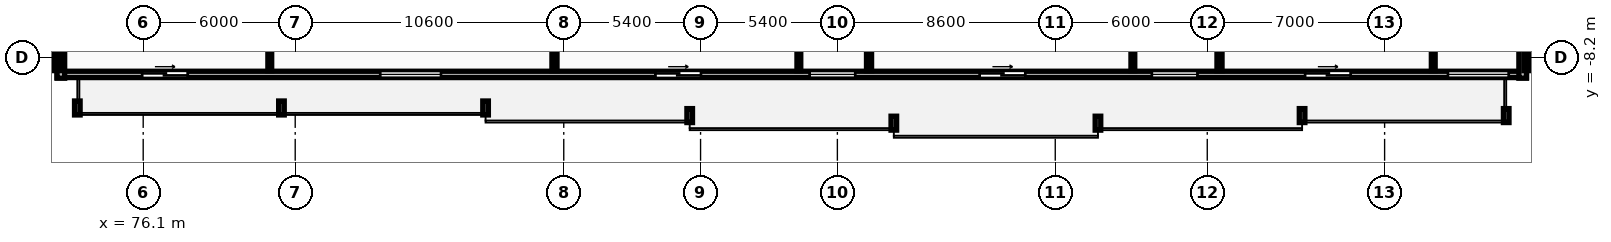
"""IFC4 building model, lengths in metres.
Left out: names, types, materials, properties, quantities, classifications, styles, units other than length and angle.
Written with IfcOpenShell. Run it as: python <this file> out.ifc"""

import sys

from ifc_helpers import new_model, si_unit, direction, frame, frame_2d, origin, place, context, subcontext, project, spatial, rectangle, extrude, element, fill, save


model = new_model("IFC4")
c1 = context("Model", 3, precision=1e-05, world=origin(), true_north=direction((0.0, 1.0)))
c2 = subcontext(c1, "Body", "Model", "MODEL_VIEW")
j1 = project(units=[si_unit("LENGTHUNIT", "METRE"), si_unit("PLANEANGLEUNIT", "RADIAN")], contexts=[c1])
p1 = place(None, origin())
s1 = spatial("IfcSite", under=j1, at=p1, CompositionType="ELEMENT")
p2 = place(p1, origin())
s2 = spatial("IfcBuilding", under=s1, at=p2, CompositionType="ELEMENT")
p3 = place(p2, frame((0.0, 0.0, 113.3)))
s3 = spatial("IfcBuildingStorey", under=s2, at=p3, CompositionType="ELEMENT", Elevation=113.3)
p4 = place(p3, frame((72.7, -8.85, 0.0), z_axis=(0.0, 0.0, 1.0), x_axis=(1.0, 0.0, 0.0)))
e1 = element("IfcWall", 1, at=p4, inside=s3, PredefinedType="STANDARD", context=c2, shape_type="SweptSolid", body=[
    extrude(rectangle(XDim=58.0, YDim=0.25, at=frame_2d((29.0, 0.0))), origin(), (0.0, 0.0, 1.0), 2.97),
])
p5 = place(p4, frame((3.358, 0.0, 0.0)))
e2 = element("IfcOpeningElement", 2, at=p5, cuts=e1, PredefinedType="OPENING", context=c2, shape_type="SweptSolid", body=[
    extrude(rectangle(XDim=1.8, YDim=2.2, at=frame_2d((0.9, 1.1))), frame((0.0, 0.135, 0.0), z_axis=(0.0, -1.0, 0.0), x_axis=(1.0, 0.0, 0.0)), (0.0, 0.0, 1.0), 0.27),
])
p6 = place(p4, frame((12.755, 0.0, 0.85)))
e3 = element("IfcOpeningElement", 3, at=p6, cuts=e1, PredefinedType="OPENING", context=c2, shape_type="SweptSolid", body=[
    extrude(rectangle(XDim=2.4, YDim=1.9, at=frame_2d((1.2, 0.95))), frame((0.0, 0.135, 0.0), z_axis=(0.0, -1.0, 0.0), x_axis=(1.0, 0.0, 0.0)), (0.0, 0.0, 1.0), 0.27),
])
p7 = place(p4, frame((23.617, 0.0, 0.0)))
e4 = element("IfcOpeningElement", 4, at=p7, cuts=e1, PredefinedType="OPENING", context=c2, shape_type="SweptSolid", body=[
    extrude(rectangle(XDim=1.8, YDim=2.2, at=frame_2d((0.9, 1.1))), frame((0.0, 0.135, 0.0), z_axis=(0.0, -1.0, 0.0), x_axis=(1.0, 0.0, 0.0)), (0.0, 0.0, 1.0), 0.27),
])
p8 = place(p4, frame((29.705, 0.0, 0.85)))
e5 = element("IfcOpeningElement", 5, at=p8, cuts=e1, PredefinedType="OPENING", context=c2, shape_type="SweptSolid", body=[
    extrude(rectangle(XDim=1.8, YDim=1.8, at=frame_2d((0.9, 0.9))), frame((0.0, 0.135, 0.0), z_axis=(0.0, -1.0, 0.0), x_axis=(1.0, 0.0, 0.0)), (0.0, 0.0, 1.0), 0.27),
])
p9 = place(p4, frame((36.417, 0.0, 0.0)))
e6 = element("IfcOpeningElement", 6, at=p9, cuts=e1, PredefinedType="OPENING", context=c2, shape_type="SweptSolid", body=[
    extrude(rectangle(XDim=1.8, YDim=2.2, at=frame_2d((0.9, 1.1))), frame((0.0, 0.135, 0.0), z_axis=(0.0, -1.0, 0.0), x_axis=(1.0, 0.0, 0.0)), (0.0, 0.0, 1.0), 0.27),
])
p10 = place(p4, frame((43.213, 0.0, 0.85)))
e7 = element("IfcOpeningElement", 7, at=p10, cuts=e1, PredefinedType="OPENING", context=c2, shape_type="SweptSolid", body=[
    extrude(rectangle(XDim=1.8, YDim=1.8, at=frame_2d((0.9, 0.9))), frame((0.0, 0.135, 0.0), z_axis=(0.0, -1.0, 0.0), x_axis=(1.0, 0.0, 0.0)), (0.0, 0.0, 1.0), 0.27),
])
p11 = place(p4, frame((49.262, 0.0, 0.0)))
e8 = element("IfcOpeningElement", 8, at=p11, cuts=e1, PredefinedType="OPENING", context=c2, shape_type="SweptSolid", body=[
    extrude(rectangle(XDim=1.8, YDim=2.2, at=frame_2d((0.9, 1.1))), frame((0.0, 0.135, 0.0), z_axis=(0.0, -1.0, 0.0), x_axis=(1.0, 0.0, 0.0)), (0.0, 0.0, 1.0), 0.27),
])
p12 = place(p4, frame((54.9, 0.0, 0.85)))
e9 = element("IfcOpeningElement", 9, at=p12, cuts=e1, PredefinedType="OPENING", context=c2, shape_type="SweptSolid", body=[
    extrude(rectangle(XDim=2.4, YDim=1.9, at=frame_2d((1.2, 0.95))), frame((0.0, 0.135, 0.0), z_axis=(0.0, -1.0, 0.0), x_axis=(1.0, 0.0, 0.0)), (0.0, 0.0, 1.0), 0.27),
])
for number, where, z_axis, x_axis in (
    (10, (130.55, -9.0, 0.0), (0.0, 0.0, 1.0), (0.0, 1.0, 0.0)),
    (11, (72.85, -5.4, 0.0), (0.0, 0.0, 1.0), (0.0, -1.0, 0.0)),
):
    element("IfcWall", number, at=place(p3, frame(where, z_axis=z_axis, x_axis=x_axis)), inside=s3, PredefinedType="STANDARD", context=c2, shape_type="SweptSolid", body=[
        extrude(rectangle(XDim=3.6, YDim=0.3, at=frame_2d((1.8, 0.0))), origin(), (0.0, 0.0, 1.0), 2.97),
    ])
for number, where, z_axis, x_axis in (
    (12, (72.7, -8.7, 0.0), (0.0, 0.0, 1.0), (0.0, 1.0, 0.0)),
    (13, (130.7, -8.7, 0.0), (0.0, 0.0, 1.0), (0.0, 1.0, 0.0)),
    (14, (92.333, -8.7, 0.0), (0.0, 0.0, 1.0), (0.0, 1.0, 0.0)),
):
    element("IfcWall", number, at=place(p3, frame(where, z_axis=z_axis, x_axis=x_axis)), inside=s3, PredefinedType="PARTITIONING", context=c2, shape_type="SweptSolid", body=[
        extrude(rectangle(XDim=24.57, YDim=0.2, at=frame_2d((12.285, 0.0))), origin(), (0.0, 0.0, 1.0), 2.97),
    ])
p13 = place(p3, frame((81.097, -8.7, 0.0), z_axis=(0.0, 0.0, 1.0), x_axis=(0.0, 1.0, 0.0)))
e15 = element("IfcWall", 15, at=p13, inside=s3, PredefinedType="PARTITIONING", context=c2, shape_type="SweptSolid", body=[
    extrude(rectangle(XDim=5.17, YDim=0.15, at=frame_2d((2.585, 0.0))), origin(), (0.0, 0.0, 1.0), 2.97),
])
p14 = place(p3, frame((104.75, -8.7, 0.0), z_axis=(0.0, 0.0, 1.0), x_axis=(0.0, 1.0, 0.0)))
e16 = element("IfcWall", 16, at=p14, inside=s3, PredefinedType="PARTITIONING", context=c2, shape_type="SweptSolid", body=[
    extrude(rectangle(XDim=24.57, YDim=0.2, at=frame_2d((12.285, 0.0))), origin(), (0.0, 0.0, 1.0), 2.97),
])
p15 = place(p3, frame((101.98, -8.7, 0.0), z_axis=(0.0, 0.0, 1.0), x_axis=(0.0, 1.0, 0.0)))
e17 = element("IfcWall", 17, at=p15, inside=s3, PredefinedType="PARTITIONING", context=c2, shape_type="SweptSolid", body=[
    extrude(rectangle(XDim=10.31, YDim=0.15, at=frame_2d((5.155, 0.0))), origin(), (0.0, 0.0, 1.0), 2.97),
])
p16 = place(p15, frame((6.12, 0.0, 0.0)))
e18 = element("IfcOpeningElement", 18, at=p16, cuts=e17, PredefinedType="OPENING", context=c2, shape_type="SweptSolid", body=[
    extrude(rectangle(XDim=0.84, YDim=2.04, at=frame_2d((0.42, 1.02))), frame((0.0, 0.085, 0.0), z_axis=(0.0, -1.0, 0.0), x_axis=(1.0, 0.0, 0.0)), (0.0, 0.0, 1.0), 0.17),
])
p17 = place(p15, frame((8.04, 0.0, 0.0)))
e19 = element("IfcOpeningElement", 19, at=p17, cuts=e17, PredefinedType="OPENING", context=c2, shape_type="SweptSolid", body=[
    extrude(rectangle(XDim=0.84, YDim=2.04, at=frame_2d((0.42, 1.02))), frame((0.0, 0.085, 0.0), z_axis=(0.0, -1.0, 0.0), x_axis=(1.0, 0.0, 0.0)), (0.0, 0.0, 1.0), 0.17),
])
p18 = place(p15, frame((2.001, 0.0, 0.0)))
e20 = element("IfcOpeningElement", 20, at=p18, cuts=e17, PredefinedType="OPENING", context=c2, shape_type="SweptSolid", body=[
    extrude(rectangle(XDim=0.88, YDim=2.06, at=frame_2d((0.44, 1.03))), frame((0.0, 0.085, 0.0), z_axis=(0.0, -1.0, 0.0), x_axis=(1.0, 0.0, 0.0)), (0.0, 0.0, 1.0), 0.17),
])
p19 = place(p3, frame((118.583, -8.7, 0.0), z_axis=(0.0, 0.0, 1.0), x_axis=(0.0, 1.0, 0.0)))
e21 = element("IfcWall", 21, at=p19, inside=s3, PredefinedType="PARTITIONING", context=c2, shape_type="SweptSolid", body=[
    extrude(rectangle(XDim=24.57, YDim=0.2, at=frame_2d((12.285, 0.0))), origin(), (0.0, 0.0, 1.0), 2.97),
])
p20 = place(p3, frame((115.163, -8.7, 0.0), z_axis=(0.0, 0.0, 1.0), x_axis=(0.0, 1.0, 0.0)))
e22 = element("IfcWall", 22, at=p20, inside=s3, PredefinedType="PARTITIONING", context=c2, shape_type="SweptSolid", body=[
    extrude(rectangle(XDim=10.31, YDim=0.15, at=frame_2d((5.155, 0.0))), origin(), (0.0, 0.0, 1.0), 2.97),
])
p21 = place(p20, frame((5.55, 0.0, 0.0)))
e23 = element("IfcOpeningElement", 23, at=p21, cuts=e22, PredefinedType="OPENING", context=c2, shape_type="SweptSolid", body=[
    extrude(rectangle(XDim=0.84, YDim=2.04, at=frame_2d((0.42, 1.02))), frame((0.0, 0.085, 0.0), z_axis=(0.0, -1.0, 0.0), x_axis=(1.0, 0.0, 0.0)), (0.0, 0.0, 1.0), 0.17),
])
p22 = place(p20, frame((8.04, 0.0, 0.0)))
e24 = element("IfcOpeningElement", 24, at=p22, cuts=e22, PredefinedType="OPENING", context=c2, shape_type="SweptSolid", body=[
    extrude(rectangle(XDim=0.84, YDim=2.04, at=frame_2d((0.42, 1.02))), frame((0.0, 0.085, 0.0), z_axis=(0.0, -1.0, 0.0), x_axis=(1.0, 0.0, 0.0)), (0.0, 0.0, 1.0), 0.17),
])
p23 = place(p20, frame((3.95, 0.0, 0.0)))
e25 = element("IfcOpeningElement", 25, at=p23, cuts=e22, PredefinedType="OPENING", context=c2, shape_type="SweptSolid", body=[
    extrude(rectangle(XDim=0.88, YDim=2.06, at=frame_2d((0.44, 1.03))), frame((0.0, 0.085, 0.0), z_axis=(0.0, -1.0, 0.0), x_axis=(1.0, 0.0, 0.0)), (0.0, 0.0, 1.0), 0.17),
])
p24 = place(p3, frame((127.02, -8.7, 0.0), z_axis=(0.0, 0.0, 1.0), x_axis=(0.0, 1.0, 0.0)))
e26 = element("IfcWall", 26, at=p24, inside=s3, PredefinedType="PARTITIONING", context=c2, shape_type="SweptSolid", body=[
    extrude(rectangle(XDim=10.31, YDim=0.15, at=frame_2d((5.155, 0.0))), origin(), (0.0, 0.0, 1.0), 2.97),
])
p25 = place(p24, frame((6.12, 0.0, 0.0)))
e27 = element("IfcOpeningElement", 27, at=p25, cuts=e26, PredefinedType="OPENING", context=c2, shape_type="SweptSolid", body=[
    extrude(rectangle(XDim=0.84, YDim=2.04, at=frame_2d((0.42, 1.02))), frame((0.0, 0.085, 0.0), z_axis=(0.0, -1.0, 0.0), x_axis=(1.0, 0.0, 0.0)), (0.0, 0.0, 1.0), 0.17),
])
p26 = place(p24, frame((8.04, 0.0, 0.0)))
e28 = element("IfcOpeningElement", 28, at=p26, cuts=e26, PredefinedType="OPENING", context=c2, shape_type="SweptSolid", body=[
    extrude(rectangle(XDim=0.84, YDim=2.04, at=frame_2d((0.42, 1.02))), frame((0.0, 0.085, 0.0), z_axis=(0.0, -1.0, 0.0), x_axis=(1.0, 0.0, 0.0)), (0.0, 0.0, 1.0), 0.17),
])
p27 = place(p24, frame((2.001, 0.0, 0.0)))
e29 = element("IfcOpeningElement", 29, at=p27, cuts=e26, PredefinedType="OPENING", context=c2, shape_type="SweptSolid", body=[
    extrude(rectangle(XDim=0.88, YDim=2.06, at=frame_2d((0.44, 1.03))), frame((0.0, 0.085, 0.0), z_axis=(0.0, -1.0, 0.0), x_axis=(1.0, 0.0, 0.0)), (0.0, 0.0, 1.0), 0.17),
])
p28 = place(p5, origin())
e30 = element("IfcDoor", 30, at=p28, inside=s3, OperationType="SLIDING_TO_RIGHT", PredefinedType="DOOR", context=c2, shape_type="SweptSolid", body=[
    extrude(rectangle(XDim=1.8, YDim=2.2, at=frame_2d((0.9, 1.1))), frame((0.0, 0.025, 0.0), z_axis=(0.0, -1.0, 0.0), x_axis=(1.0, 0.0, 0.0)), (0.0, 0.0, 1.0), 0.05),
])
fill(e2, e30)
p29 = place(p6, origin())
e31 = element("IfcWindow", 31, at=p29, inside=s3, PartitioningType="DOUBLE_PANEL_VERTICAL", PredefinedType="WINDOW", context=c2, shape_type="SweptSolid", body=[
    extrude(rectangle(XDim=2.4, YDim=1.9, at=frame_2d((1.2, 0.95))), frame((0.0, 0.03, 0.0), z_axis=(0.0, -1.0, 0.0), x_axis=(1.0, 0.0, 0.0)), (0.0, 0.0, 1.0), 0.06),
])
fill(e3, e31)
p30 = place(p7, origin())
e32 = element("IfcDoor", 32, at=p30, inside=s3, OperationType="SLIDING_TO_RIGHT", PredefinedType="DOOR", context=c2, shape_type="SweptSolid", body=[
    extrude(rectangle(XDim=1.8, YDim=2.2, at=frame_2d((0.9, 1.1))), frame((0.0, 0.025, 0.0), z_axis=(0.0, -1.0, 0.0), x_axis=(1.0, 0.0, 0.0)), (0.0, 0.0, 1.0), 0.05),
])
fill(e4, e32)
p31 = place(p8, origin())
e33 = element("IfcWindow", 33, at=p31, inside=s3, PartitioningType="SINGLE_PANEL", PredefinedType="WINDOW", context=c2, shape_type="SweptSolid", body=[
    extrude(rectangle(XDim=1.8, YDim=1.8, at=frame_2d((0.9, 0.9))), frame((0.0, 0.03, 0.0), z_axis=(0.0, -1.0, 0.0), x_axis=(1.0, 0.0, 0.0)), (0.0, 0.0, 1.0), 0.06),
])
fill(e5, e33)
p32 = place(p9, origin())
e34 = element("IfcDoor", 34, at=p32, inside=s3, OperationType="SLIDING_TO_RIGHT", PredefinedType="DOOR", context=c2, shape_type="SweptSolid", body=[
    extrude(rectangle(XDim=1.8, YDim=2.2, at=frame_2d((0.9, 1.1))), frame((0.0, 0.025, 0.0), z_axis=(0.0, -1.0, 0.0), x_axis=(1.0, 0.0, 0.0)), (0.0, 0.0, 1.0), 0.05),
])
fill(e6, e34)
p33 = place(p10, origin())
e35 = element("IfcWindow", 35, at=p33, inside=s3, PartitioningType="SINGLE_PANEL", PredefinedType="WINDOW", context=c2, shape_type="SweptSolid", body=[
    extrude(rectangle(XDim=1.8, YDim=1.8, at=frame_2d((0.9, 0.9))), frame((0.0, 0.03, 0.0), z_axis=(0.0, -1.0, 0.0), x_axis=(1.0, 0.0, 0.0)), (0.0, 0.0, 1.0), 0.06),
])
fill(e7, e35)
p34 = place(p11, origin())
e36 = element("IfcDoor", 36, at=p34, inside=s3, OperationType="SLIDING_TO_RIGHT", PredefinedType="DOOR", context=c2, shape_type="SweptSolid", body=[
    extrude(rectangle(XDim=1.8, YDim=2.2, at=frame_2d((0.9, 1.1))), frame((0.0, 0.025, 0.0), z_axis=(0.0, -1.0, 0.0), x_axis=(1.0, 0.0, 0.0)), (0.0, 0.0, 1.0), 0.05),
])
fill(e8, e36)
p35 = place(p12, origin())
e37 = element("IfcWindow", 37, at=p35, inside=s3, PartitioningType="DOUBLE_PANEL_VERTICAL", PredefinedType="WINDOW", context=c2, shape_type="SweptSolid", body=[
    extrude(rectangle(XDim=2.4, YDim=1.9, at=frame_2d((1.2, 0.95))), frame((0.0, 0.03, 0.0), z_axis=(0.0, -1.0, 0.0), x_axis=(1.0, 0.0, 0.0)), (0.0, 0.0, 1.0), 0.06),
])
fill(e9, e37)
save(model, sys.argv[1])
